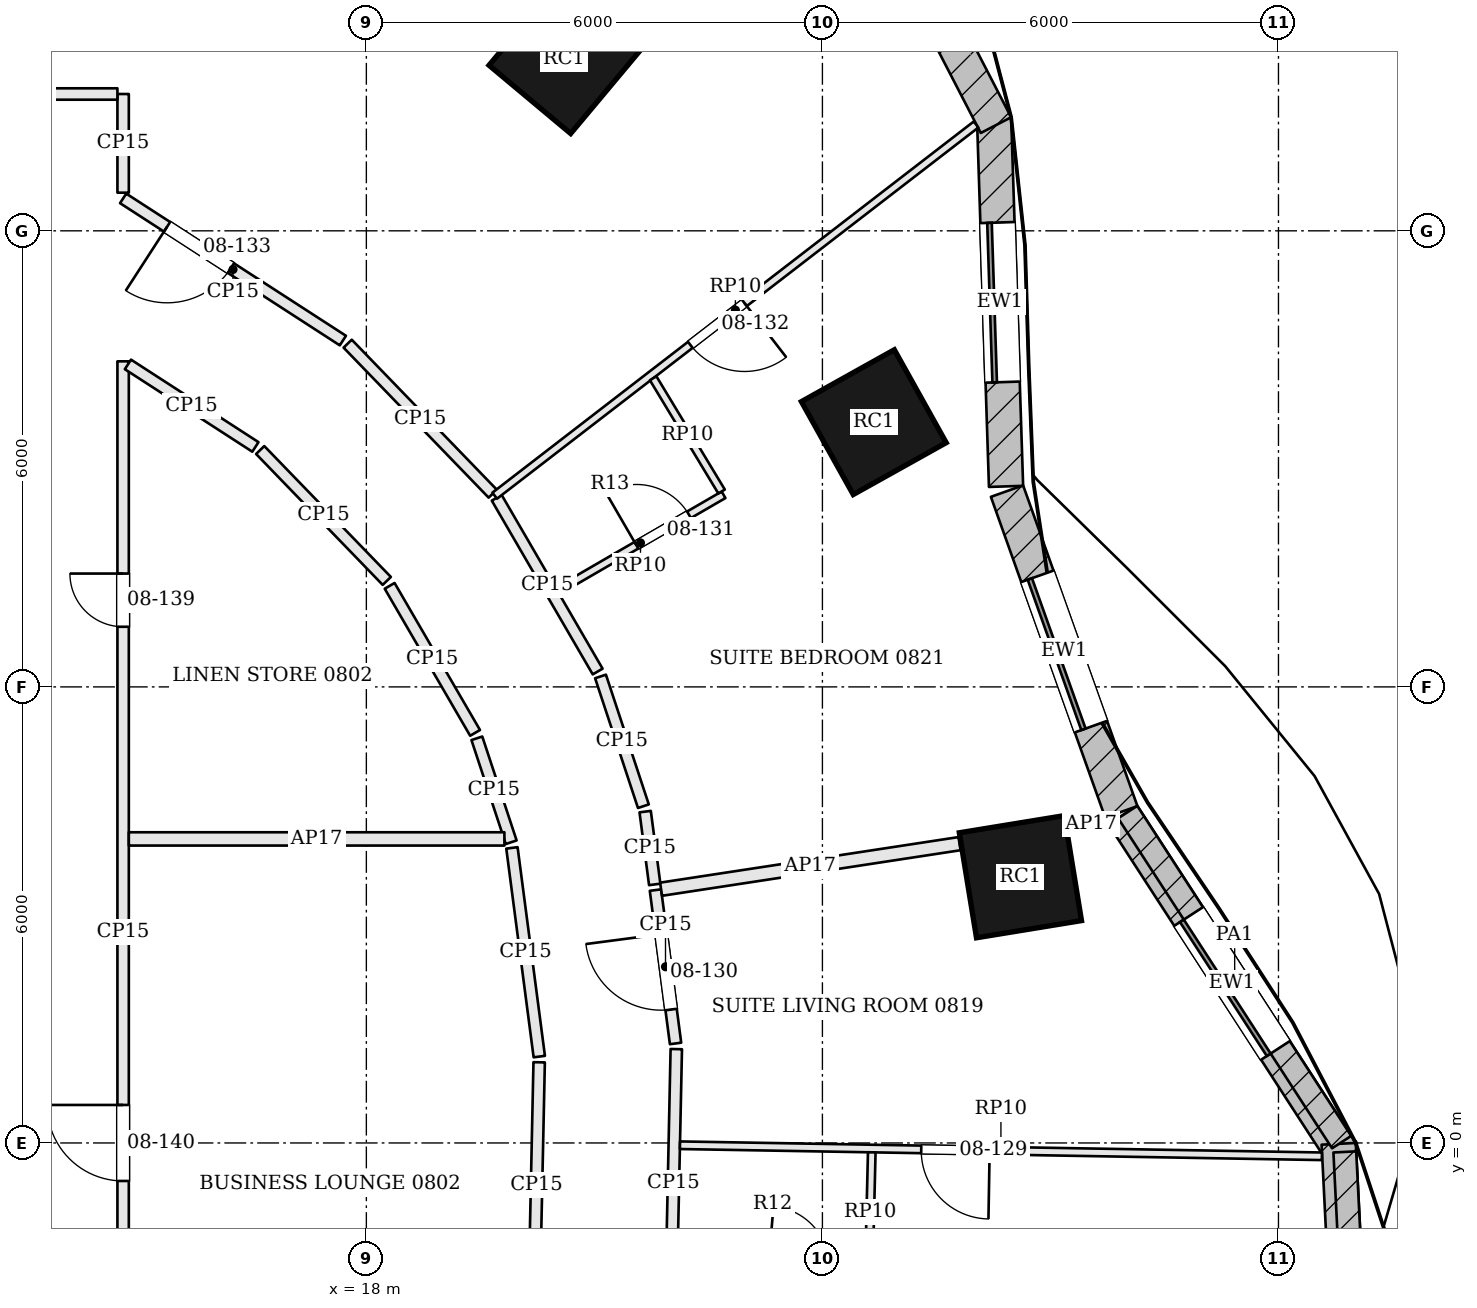
"""IFC4 building model, lengths in metres.
Left out: names, types, materials, properties, quantities, classifications, styles, units other than length and angle.
Written with IfcOpenShell. Run it as: python <this file> out.ifc"""

import sys

from ifc_helpers import new_model, si_unit, direction, frame, frame_2d, origin, origin_2d, place, context, subcontext, project, spatial, rectangle, extrude, element, fill, save


model = new_model("IFC4")
c1 = context("Model", 3, precision=1e-05, world=origin(), true_north=direction((0.0, 1.0)))
c2 = subcontext(c1, "Body", "Model", "MODEL_VIEW")
j1 = project(units=[si_unit("LENGTHUNIT", "METRE"), si_unit("PLANEANGLEUNIT", "RADIAN")], contexts=[c1])
p1 = place(None, origin())
s1 = spatial("IfcSite", under=j1, at=p1, CompositionType="ELEMENT")
p2 = place(p1, origin())
s2 = spatial("IfcBuilding", under=s1, at=p2, CompositionType="ELEMENT")
p3 = place(p2, frame((0.0, 0.0, 44.7)))
s3 = spatial("IfcBuildingStorey", under=s2, at=p3, CompositionType="ELEMENT", Elevation=44.7)
for number, where, z_axis, x_axis in (
    (1, (26.605, 3.503, 0.0), (0.0, 0.0, 1.0), (-0.161, 0.987, 0.0)),
    (2, (24.676, 9.483, 0.0), (0.0, 0.0, 1.0), (-0.487, 0.873, 0.0)),
    (3, (20.6, 14.266, 0.0), (0.0, 0.0, 1.0), (-0.767, 0.641, 0.0)),
):
    element("IfcColumn", number, at=place(p3, frame(where, z_axis=z_axis, x_axis=x_axis)), inside=s3, PredefinedType="COLUMN", context=c2, shape_type="SweptSolid", body=[
        extrude(rectangle(XDim=1.4, YDim=1.4, at=origin_2d()), origin(), (0.0, 0.0, 1.0), 3.6),
    ])
p4 = place(p3, frame((30.825, -0.117, 0.0), z_axis=(0.0, 0.0, 1.0), x_axis=(-0.543975629516, 0.839101015666, 0.0)))
e4 = element("IfcWall", 4, at=p4, inside=s3, PredefinedType="SOLIDWALL", context=c2, shape_type="SweptSolid", body=[
    extrude(rectangle(XDim=5.281, YDim=0.45, at=frame_2d((2.641, 0.0))), origin(), (0.0, 0.0, 1.0), 3.4),
])
p5 = place(p4, frame((1.591, 0.0, 0.9)))
e5 = element("IfcOpeningElement", 5, at=p5, cuts=e4, PredefinedType="OPENING", context=c2, shape_type="SweptSolid", body=[
    extrude(rectangle(XDim=2.1, YDim=2.0, at=frame_2d((1.05, 1.0))), frame((0.0, 0.235, 0.0), z_axis=(0.0, -1.0, 0.0), x_axis=(1.0, 0.0, 0.0)), (0.0, 0.0, 1.0), 0.47),
])
p6 = place(p3, frame((27.933, 4.356, 0.0), z_axis=(0.0, 0.0, 1.0), x_axis=(-0.335746005454, 0.941952557097, 0.0)))
e6 = element("IfcWall", 6, at=p6, inside=s3, PredefinedType="SOLIDWALL", context=c2, shape_type="SweptSolid", body=[
    extrude(rectangle(XDim=4.48, YDim=0.45, at=frame_2d((2.24, 0.0))), origin(), (0.0, 0.0, 1.0), 3.4),
])
p7 = place(p6, frame((1.19, 0.0, 0.9)))
e7 = element("IfcOpeningElement", 7, at=p7, cuts=e6, PredefinedType="OPENING", context=c2, shape_type="SweptSolid", body=[
    extrude(rectangle(XDim=2.1, YDim=2.0, at=frame_2d((1.05, 1.0))), frame((0.0, 0.235, 0.0), z_axis=(0.0, -1.0, 0.0), x_axis=(1.0, 0.0, 0.0)), (0.0, 0.0, 1.0), 0.47),
])
p8 = place(p3, frame((26.416, 8.638, 0.0), z_axis=(0.0, 0.0, 1.0), x_axis=(-0.03254979302, 0.999470115098, 0.0)))
e8 = element("IfcWall", 8, at=p8, inside=s3, PredefinedType="SOLIDWALL", context=c2, shape_type="SweptSolid", body=[
    extrude(rectangle(XDim=4.845, YDim=0.45, at=frame_2d((2.423, 0.0))), origin(), (0.0, 0.0, 1.0), 3.4),
])
p9 = place(p8, frame((1.373, 0.0, 0.9)))
e9 = element("IfcOpeningElement", 9, at=p9, cuts=e8, PredefinedType="OPENING", context=c2, shape_type="SweptSolid", body=[
    extrude(rectangle(XDim=2.1, YDim=2.0, at=frame_2d((1.05, 1.0))), frame((0.0, 0.235, 0.0), z_axis=(0.0, -1.0, 0.0), x_axis=(1.0, 0.0, 0.0)), (0.0, 0.0, 1.0), 0.47),
])
p10 = place(p3, frame((26.283, 13.391, 0.0), z_axis=(0.0, 0.0, 1.0), x_axis=(-0.459485057932, 0.888185499509, 0.0)))
e10 = element("IfcWall", 10, at=p10, inside=s3, PredefinedType="SOLIDWALL", context=c2, shape_type="SweptSolid", body=[
    extrude(rectangle(XDim=4.703, YDim=0.45, at=frame_2d((2.352, 0.0))), origin(), (0.0, 0.0, 1.0), 3.4),
])
p11 = place(p10, frame((1.451, 0.0, 0.9)))
e11 = element("IfcOpeningElement", 11, at=p11, cuts=e10, PredefinedType="OPENING", context=c2, shape_type="SweptSolid", body=[
    extrude(rectangle(XDim=1.8, YDim=2.0, at=frame_2d((0.9, 1.0))), frame((0.0, 0.235, 0.0), z_axis=(0.0, -1.0, 0.0), x_axis=(1.0, 0.0, 0.0)), (0.0, 0.0, 1.0), 0.47),
])
p12 = place(p3, frame((31.041, -4.963, 0.0), z_axis=(0.0, 0.0, 1.0), x_axis=(-0.050222481563, 0.99873805492, 0.0)))
e12 = element("IfcWall", 12, at=p12, inside=s3, PredefinedType="SOLIDWALL", context=c2, shape_type="SweptSolid", body=[
    extrude(rectangle(XDim=4.958, YDim=0.45, at=frame_2d((2.479, 0.0))), origin(), (0.0, 0.0, 1.0), 3.4),
])
p13 = place(p12, frame((1.429, 0.0, 0.9)))
e13 = element("IfcOpeningElement", 13, at=p13, cuts=e12, PredefinedType="OPENING", context=c2, shape_type="SweptSolid", body=[
    extrude(rectangle(XDim=2.1, YDim=2.0, at=frame_2d((1.05, 1.0))), frame((0.0, 0.235, 0.0), z_axis=(0.0, -1.0, 0.0), x_axis=(1.0, 0.0, 0.0)), (0.0, 0.0, 1.0), 0.47),
])
p14 = place(p3, frame((30.831, 0.011, 3.6), z_axis=(0.0, 0.0, 1.0), x_axis=(-0.543918219167, 0.839138231079, 0.0)))
e14 = element("IfcWall", 14, at=p14, inside=s3, PredefinedType="PARAPET", context=c2, shape_type="SweptSolid", body=[
    extrude(rectangle(XDim=5.174, YDim=0.3, at=frame_2d((2.587, 0.0))), origin(), (0.0, 0.0, 1.0), 1.1),
])
p15 = place(p3, frame((31.116, -4.959, 3.6), z_axis=(0.0, 0.0, 1.0), x_axis=(-0.05021140618, 0.998738611795, 0.0)))
e15 = element("IfcWall", 15, at=p15, inside=s3, PredefinedType="PARAPET", context=c2, shape_type="SweptSolid", body=[
    extrude(rectangle(XDim=4.848, YDim=0.3, at=frame_2d((2.424, 0.0))), origin(), (0.0, 0.0, 1.0), 1.1),
])
p16 = place(p3, frame((13.863, 18.572, 0.0), z_axis=(0.0, 0.0, 1.0), x_axis=(-0.320254541028, -0.947331530643, 0.0)))
e16 = element("IfcWall", 16, at=p16, inside=s3, PredefinedType="PARTITIONING", context=c2, shape_type="SweptSolid", body=[
    extrude(rectangle(XDim=4.962, YDim=0.175, at=frame_2d((2.481, 0.0))), origin(), (0.0, 0.0, 1.0), 2.68),
])
p17 = place(p3, frame((22.003, -2.281, 0.0), z_axis=(0.0, 0.0, 1.0), x_axis=(0.021172866829, 0.999775829729, 0.0)))
e17 = element("IfcWall", 17, at=p17, inside=s3, PredefinedType="PARTITIONING", context=c2, shape_type="SweptSolid", body=[
    extrude(rectangle(XDim=3.517, YDim=0.15, at=frame_2d((1.758, 0.0))), origin(), (0.0, 0.0, 1.0), 2.68),
])
p18 = place(p3, frame((22.068, 1.309, 0.0), z_axis=(0.0, 0.0, 1.0), x_axis=(-0.129923831537, 0.991523977521, 0.0)))
e18 = element("IfcWall", 18, at=p18, inside=s3, PredefinedType="PARTITIONING", context=c2, shape_type="SweptSolid", body=[
    extrude(rectangle(XDim=2.035, YDim=0.15, at=frame_2d((1.018, 0.0))), origin(), (0.0, 0.0, 1.0), 2.68),
])
p19 = place(p18, frame((0.45, 0.0, 0.0)))
e19 = element("IfcOpeningElement", 19, at=p19, cuts=e18, PredefinedType="OPENING", context=c2, shape_type="SweptSolid", body=[
    extrude(rectangle(XDim=1.0, YDim=2.1, at=frame_2d((0.5, 1.05))), frame((0.0, 0.085, 0.0), z_axis=(0.0, -1.0, 0.0), x_axis=(1.0, 0.0, 0.0)), (0.0, 0.0, 1.0), 0.17),
])
p20 = place(p3, frame((27.845, 4.249, 0.0), z_axis=(0.0, 0.0, 1.0), x_axis=(-0.988533937995, -0.15099885242, 0.0)))
e20 = element("IfcWall", 20, at=p20, inside=s3, PredefinedType="PARTITIONING", context=c2, shape_type="SweptSolid", body=[
    extrude(rectangle(XDim=0.624, YDim=0.175, at=frame_2d((0.312, 0.0))), origin(), (0.0, 0.0, 1.0), 2.68),
])
p21 = place(p3, frame((25.804, 3.938, 0.0), z_axis=(0.0, 0.0, 1.0), x_axis=(-0.988543004534, -0.150939485181, 0.0)))
e21 = element("IfcWall", 21, at=p21, inside=s3, PredefinedType="PARTITIONING", context=c2, shape_type="SweptSolid", body=[
    extrude(rectangle(XDim=3.972, YDim=0.175, at=frame_2d((1.986, 0.0))), origin(), (0.0, 0.0, 1.0), 2.68),
])
p22 = place(p3, frame((21.794, 3.401, 0.0), z_axis=(0.0, 0.0, 1.0), x_axis=(-0.129911835925, 0.991525549286, 0.0)))
e22 = element("IfcWall", 22, at=p22, inside=s3, PredefinedType="PARTITIONING", context=c2, shape_type="SweptSolid", body=[
    extrude(rectangle(XDim=0.966, YDim=0.15, at=frame_2d((0.483, 0.0))), origin(), (0.0, 0.0, 1.0), 2.68),
])
p23 = place(p3, frame((21.645, 4.43, 0.0), z_axis=(0.0, 0.0, 1.0), x_axis=(-0.313700743044, 0.949521902756, 0.0)))
e23 = element("IfcWall", 23, at=p23, inside=s3, PredefinedType="PARTITIONING", context=c2, shape_type="SweptSolid", body=[
    extrude(rectangle(XDim=1.798, YDim=0.15, at=frame_2d((0.899, 0.0))), origin(), (0.0, 0.0, 1.0), 2.68),
])
p24 = place(p3, frame((21.043, 6.202, 0.0), z_axis=(0.0, 0.0, 1.0), x_axis=(-0.502371650135, 0.864651794158, 0.0)))
e24 = element("IfcWall", 24, at=p24, inside=s3, PredefinedType="PARTITIONING", context=c2, shape_type="SweptSolid", body=[
    extrude(rectangle(XDim=2.644, YDim=0.15, at=frame_2d((1.322, 0.0))), origin(), (0.0, 0.0, 1.0), 2.68),
])
p25 = place(p3, frame((19.663, 8.542, 0.0), z_axis=(0.0, 0.0, 1.0), x_axis=(-0.695225869021, 0.718791340407, 0.0)))
e25 = element("IfcWall", 25, at=p25, inside=s3, PredefinedType="PARTITIONING", context=c2, shape_type="SweptSolid", body=[
    extrude(rectangle(XDim=2.745, YDim=0.15, at=frame_2d((1.373, 0.0))), origin(), (0.0, 0.0, 1.0), 2.68),
])
p26 = place(p3, frame((17.691, 10.556, 0.0), z_axis=(0.0, 0.0, 1.0), x_axis=(-0.839564450265, 0.54326009779, 0.0)))
e26 = element("IfcWall", 26, at=p26, inside=s3, PredefinedType="PARTITIONING", context=c2, shape_type="SweptSolid", body=[
    extrude(rectangle(XDim=3.443, YDim=0.15, at=frame_2d((1.722, 0.0))), origin(), (0.0, 0.0, 1.0), 2.68),
])
p27 = place(p26, frame((1.755, 0.0, 0.0)))
e27 = element("IfcOpeningElement", 27, at=p27, cuts=e26, PredefinedType="OPENING", context=c2, shape_type="SweptSolid", body=[
    extrude(rectangle(XDim=1.0, YDim=2.1, at=frame_2d((0.5, 1.05))), frame((0.0, 0.085, 0.0), z_axis=(0.0, -1.0, 0.0), x_axis=(1.0, 0.0, 0.0)), (0.0, 0.0, 1.0), 0.17),
])
p28 = place(p3, frame((14.8, 12.502, 0.0), z_axis=(0.0, 0.0, 1.0), x_axis=(-0.000188040613, 0.99999998232, 0.0)))
e28 = element("IfcWall", 28, at=p28, inside=s3, PredefinedType="PARTITIONING", context=c2, shape_type="SweptSolid", body=[
    extrude(rectangle(XDim=1.298, YDim=0.15, at=frame_2d((0.649, 0.0))), origin(), (0.0, 0.0, 1.0), 2.68),
])
p29 = place(p3, frame((14.725, 13.8, 0.0), z_axis=(0.0, 0.0, 1.0), x_axis=(-1.0, 0.0, 0.0)))
e29 = element("IfcWall", 29, at=p29, inside=s3, PredefinedType="PARTITIONING", context=c2, shape_type="SweptSolid", body=[
    extrude(rectangle(XDim=2.4, YDim=0.15, at=frame_2d((1.2, 0.0))), origin(), (0.0, 0.0, 1.0), 2.68),
])
p30 = place(p3, frame((16.604, 9.116, 0.0), z_axis=(0.0, 0.0, 1.0), x_axis=(0.695185405932, -0.718830474716, 0.0)))
e30 = element("IfcWall", 30, at=p30, inside=s3, PredefinedType="PARTITIONING", context=c2, shape_type="SweptSolid", body=[
    extrude(rectangle(XDim=2.396, YDim=0.15, at=frame_2d((1.198, 0.0))), origin(), (0.0, 0.0, 1.0), 2.68),
])
p31 = place(p3, frame((18.306, 7.329, 0.0), z_axis=(0.0, 0.0, 1.0), x_axis=(0.502425081691, -0.864620747662, 0.0)))
e31 = element("IfcWall", 31, at=p31, inside=s3, PredefinedType="PARTITIONING", context=c2, shape_type="SweptSolid", body=[
    extrude(rectangle(XDim=2.237, YDim=0.15, at=frame_2d((1.119, 0.0))), origin(), (0.0, 0.0, 1.0), 2.68),
])
p32 = place(p3, frame((19.454, 5.324, 0.0), z_axis=(0.0, 0.0, 1.0), x_axis=(0.313632756375, -0.949544361327, 0.0)))
e32 = element("IfcWall", 32, at=p32, inside=s3, PredefinedType="PARTITIONING", context=c2, shape_type="SweptSolid", body=[
    extrude(rectangle(XDim=1.44, YDim=0.15, at=frame_2d((0.72, 0.0))), origin(), (0.0, 0.0, 1.0), 2.68),
])
p33 = place(p3, frame((19.915, 3.882, 0.0), z_axis=(0.0, 0.0, 1.0), x_axis=(0.129945947446, -0.991521079323, 0.0)))
e33 = element("IfcWall", 33, at=p33, inside=s3, PredefinedType="PARTITIONING", context=c2, shape_type="SweptSolid", body=[
    extrude(rectangle(XDim=2.769, YDim=0.15, at=frame_2d((1.385, 0.0))), origin(), (0.0, 0.0, 1.0), 2.68),
])
p34 = place(p3, frame((20.273, 1.061, 0.0), z_axis=(0.0, 0.0, 1.0), x_axis=(-0.021166906337, -0.99977595594, 0.0)))
e34 = element("IfcWall", 34, at=p34, inside=s3, PredefinedType="PARTITIONING", context=c2, shape_type="SweptSolid", body=[
    extrude(rectangle(XDim=3.218, YDim=0.15, at=frame_2d((1.609, 0.0))), origin(), (0.0, 0.0, 1.0), 2.68),
])
p35 = place(p3, frame((14.8, -4.725, 0.0), z_axis=(0.0, 0.0, 1.0), x_axis=(0.0, 1.0, 0.0)))
e35 = element("IfcWall", 35, at=p35, inside=s3, PredefinedType="PARTITIONING", context=c2, shape_type="SweptSolid", body=[
    extrude(rectangle(XDim=15.008, YDim=0.15, at=frame_2d((7.504, 0.0))), origin(), (0.0, 0.0, 1.0), 2.68),
])
p36 = place(p35, frame((11.516, 0.0, 0.0)))
e36 = element("IfcOpeningElement", 36, at=p36, cuts=e35, PredefinedType="OPENING", context=c2, shape_type="SweptSolid", body=[
    extrude(rectangle(XDim=0.7, YDim=2.1, at=frame_2d((0.35, 1.05))), frame((0.0, 0.085, 0.0), z_axis=(0.0, -1.0, 0.0), x_axis=(1.0, 0.0, 0.0)), (0.0, 0.0, 1.0), 0.17),
])
p37 = place(p35, frame((4.225, 0.0, 0.0)))
e37 = element("IfcOpeningElement", 37, at=p37, cuts=e35, PredefinedType="OPENING", context=c2, shape_type="SweptSolid", body=[
    extrude(rectangle(XDim=1.0, YDim=2.1, at=frame_2d((0.5, 1.05))), frame((0.0, 0.085, 0.0), z_axis=(0.0, -1.0, 0.0), x_axis=(1.0, 0.0, 0.0)), (0.0, 0.0, 1.0), 0.17),
])
p38 = place(p3, frame((14.863, 10.242, 0.0), z_axis=(0.0, 0.0, 1.0), x_axis=(0.839530811724, -0.543312079901, 0.0)))
e38 = element("IfcWall", 38, at=p38, inside=s3, PredefinedType="PARTITIONING", context=c2, shape_type="SweptSolid", body=[
    extrude(rectangle(XDim=1.998, YDim=0.15, at=frame_2d((0.999, 0.0))), origin(), (0.0, 0.0, 1.0), 2.68),
])
p39 = place(p3, frame((30.571, -0.175, 0.0), z_axis=(0.0, 0.0, 1.0), x_axis=(-0.999851615206, 0.017226362636, 0.0)))
e39 = element("IfcWall", 39, at=p39, inside=s3, PredefinedType="PARTITIONING", context=c2, shape_type="SweptSolid", body=[
    extrude(rectangle(XDim=8.447, YDim=0.1, at=frame_2d((4.223, 0.0))), origin(), (0.0, 0.0, 1.0), 2.68),
])
p40 = place(p39, frame((4.372, 0.0, 0.0)))
e40 = element("IfcOpeningElement", 40, at=p40, cuts=e39, PredefinedType="OPENING", context=c2, shape_type="SweptSolid", body=[
    extrude(rectangle(XDim=0.9, YDim=2.4, at=frame_2d((0.45, 1.2))), frame((0.0, 0.06, 0.0), z_axis=(0.0, -1.0, 0.0), x_axis=(1.0, 0.0, 0.0)), (0.0, 0.0, 1.0), 0.12),
])
p41 = place(p3, frame((24.611, -1.693, 0.0), z_axis=(0.0, 0.0, 1.0), x_axis=(0.02410249982, 0.999709492554, 0.0)))
e41 = element("IfcWall", 41, at=p41, inside=s3, PredefinedType="PARTITIONING", context=c2, shape_type="SweptSolid", body=[
    extrude(rectangle(XDim=1.57, YDim=0.1, at=frame_2d((0.785, 0.0))), origin(), (0.0, 0.0, 1.0), 2.68),
])
p42 = place(p3, frame((26.021, 13.398, 0.0), z_axis=(0.0, 0.0, 1.0), x_axis=(-0.791905002939, -0.610644304256, 0.0)))
e42 = element("IfcWall", 42, at=p42, inside=s3, PredefinedType="PARTITIONING", context=c2, shape_type="SweptSolid", body=[
    extrude(rectangle(XDim=7.997, YDim=0.1, at=frame_2d((3.998, 0.0))), origin(), (0.0, 0.0, 1.0), 2.68),
])
p43 = place(p42, frame((3.847, 0.0, 0.0)))
e43 = element("IfcOpeningElement", 43, at=p43, cuts=e42, PredefinedType="OPENING", context=c2, shape_type="SweptSolid", body=[
    extrude(rectangle(XDim=0.9, YDim=2.4, at=frame_2d((0.45, 1.2))), frame((0.0, 0.06, 0.0), z_axis=(0.0, -1.0, 0.0), x_axis=(1.0, 0.0, 0.0)), (0.0, 0.0, 1.0), 0.12),
])
p44 = place(p3, frame((20.514, 7.261, 0.0), z_axis=(0.0, 0.0, 1.0), x_axis=(0.865216596083, 0.501398286656, 0.0)))
e44 = element("IfcWall", 44, at=p44, inside=s3, PredefinedType="PARTITIONING", context=c2, shape_type="SweptSolid", body=[
    extrude(rectangle(XDim=2.525, YDim=0.1, at=frame_2d((1.263, 0.0))), origin(), (0.0, 0.0, 1.0), 2.68),
])
p45 = place(p44, frame((1.2, 0.0, 0.0)))
e45 = element("IfcOpeningElement", 45, at=p45, cuts=e44, PredefinedType="OPENING", context=c2, shape_type="SweptSolid", body=[
    extrude(rectangle(XDim=0.8, YDim=2.1, at=frame_2d((0.4, 1.05))), frame((0.0, 0.06, 0.0), z_axis=(0.0, -1.0, 0.0), x_axis=(1.0, 0.0, 0.0)), (0.0, 0.0, 1.0), 0.12),
])
p46 = place(p3, frame((22.673, 8.57, 0.0), z_axis=(0.0, 0.0, 1.0), x_axis=(-0.516989335604, 0.855991838087, 0.0)))
e46 = element("IfcWall", 46, at=p46, inside=s3, PredefinedType="PARTITIONING", context=c2, shape_type="SweptSolid", body=[
    extrude(rectangle(XDim=1.741, YDim=0.1, at=frame_2d((0.87, 0.0))), origin(), (0.0, 0.0, 1.0), 2.68),
])
p47 = place(p3, frame((14.875, 4.0, 0.0), z_axis=(0.0, 0.0, 1.0), x_axis=(1.0, 0.0, 0.0)))
e47 = element("IfcWall", 47, at=p47, inside=s3, PredefinedType="PARTITIONING", context=c2, shape_type="SweptSolid", body=[
    extrude(rectangle(XDim=4.941, YDim=0.175, at=frame_2d((2.471, 0.0))), origin(), (0.0, 0.0, 1.0), 2.68),
])
p48 = place(p5, origin())
e48 = element("IfcWindow", 48, at=p48, inside=s3, PartitioningType="SINGLE_PANEL", PredefinedType="WINDOW", context=c2, shape_type="SweptSolid", body=[
    extrude(rectangle(XDim=2.1, YDim=2.0, at=frame_2d((1.05, 1.0))), frame((0.0, 0.135, 0.0), z_axis=(0.0, -1.0, 0.0), x_axis=(1.0, 0.0, 0.0)), (0.0, 0.0, 1.0), 0.06),
])
fill(e5, e48)
p49 = place(p7, origin())
e49 = element("IfcWindow", 49, at=p49, inside=s3, PartitioningType="SINGLE_PANEL", PredefinedType="WINDOW", context=c2, shape_type="SweptSolid", body=[
    extrude(rectangle(XDim=2.1, YDim=2.0, at=frame_2d((1.05, 1.0))), frame((0.0, 0.135, 0.0), z_axis=(0.0, -1.0, 0.0), x_axis=(1.0, 0.0, 0.0)), (0.0, 0.0, 1.0), 0.06),
])
fill(e7, e49)
p50 = place(p9, origin())
e50 = element("IfcWindow", 50, at=p50, inside=s3, PartitioningType="SINGLE_PANEL", PredefinedType="WINDOW", context=c2, shape_type="SweptSolid", body=[
    extrude(rectangle(XDim=2.1, YDim=2.0, at=frame_2d((1.05, 1.0))), frame((0.0, 0.135, 0.0), z_axis=(0.0, -1.0, 0.0), x_axis=(1.0, 0.0, 0.0)), (0.0, 0.0, 1.0), 0.06),
])
fill(e9, e50)
p51 = place(p40, origin())
e51 = element("IfcDoor", 51, at=p51, inside=s3, OperationType="SINGLE_SWING_LEFT", PredefinedType="DOOR", context=c2, shape_type="SweptSolid", body=[
    extrude(rectangle(XDim=0.9, YDim=2.4, at=frame_2d((0.45, 1.2))), frame((0.0, 0.025, 0.0), z_axis=(0.0, -1.0, 0.0), x_axis=(1.0, 0.0, 0.0)), (0.0, 0.0, 1.0), 0.05),
])
fill(e40, e51)
p52 = place(p19, origin())
e52 = element("IfcDoor", 52, at=p52, inside=s3, OperationType="SINGLE_SWING_RIGHT", PredefinedType="DOOR", context=c2, shape_type="SweptSolid", body=[
    extrude(rectangle(XDim=1.0, YDim=2.1, at=frame_2d((0.5, 1.05))), frame((0.0, 0.025, 0.0), z_axis=(0.0, -1.0, 0.0), x_axis=(1.0, 0.0, 0.0)), (0.0, 0.0, 1.0), 0.05),
])
fill(e19, e52)
p53 = place(p45, origin())
e53 = element("IfcDoor", 53, at=p53, inside=s3, OperationType="SINGLE_SWING_LEFT", PredefinedType="DOOR", context=c2, shape_type="SweptSolid", body=[
    extrude(rectangle(XDim=0.8, YDim=2.1, at=frame_2d((0.4, 1.05))), frame((0.0, 0.025, 0.0), z_axis=(0.0, -1.0, 0.0), x_axis=(1.0, 0.0, 0.0)), (0.0, 0.0, 1.0), 0.05),
])
fill(e45, e53)
p54 = place(p43, origin())
e54 = element("IfcDoor", 54, at=p54, inside=s3, OperationType="SINGLE_SWING_LEFT", PredefinedType="DOOR", context=c2, shape_type="SweptSolid", body=[
    extrude(rectangle(XDim=0.9, YDim=2.4, at=frame_2d((0.45, 1.2))), frame((0.0, 0.025, 0.0), z_axis=(0.0, -1.0, 0.0), x_axis=(1.0, 0.0, 0.0)), (0.0, 0.0, 1.0), 0.05),
])
fill(e43, e54)
p55 = place(p27, origin())
e55 = element("IfcDoor", 55, at=p55, inside=s3, OperationType="SINGLE_SWING_RIGHT", PredefinedType="DOOR", context=c2, shape_type="SweptSolid", body=[
    extrude(rectangle(XDim=1.0, YDim=2.1, at=frame_2d((0.5, 1.05))), frame((0.0, 0.025, 0.0), z_axis=(0.0, -1.0, 0.0), x_axis=(1.0, 0.0, 0.0)), (0.0, 0.0, 1.0), 0.05),
])
fill(e27, e55)
p56 = place(p36, origin())
e56 = element("IfcDoor", 56, at=p56, inside=s3, OperationType="SINGLE_SWING_RIGHT", PredefinedType="DOOR", context=c2, shape_type="SweptSolid", body=[
    extrude(rectangle(XDim=0.7, YDim=2.1, at=frame_2d((0.35, 1.05))), frame((0.0, 0.025, 0.0), z_axis=(0.0, -1.0, 0.0), x_axis=(1.0, 0.0, 0.0)), (0.0, 0.0, 1.0), 0.05),
])
fill(e36, e56)
p57 = place(p37, origin())
e57 = element("IfcDoor", 57, at=p57, inside=s3, OperationType="SINGLE_SWING_RIGHT", PredefinedType="DOOR", context=c2, shape_type="SweptSolid", body=[
    extrude(rectangle(XDim=1.0, YDim=2.1, at=frame_2d((0.5, 1.05))), frame((0.0, 0.025, 0.0), z_axis=(0.0, -1.0, 0.0), x_axis=(1.0, 0.0, 0.0)), (0.0, 0.0, 1.0), 0.05),
])
fill(e37, e57)
save(model, sys.argv[1])
